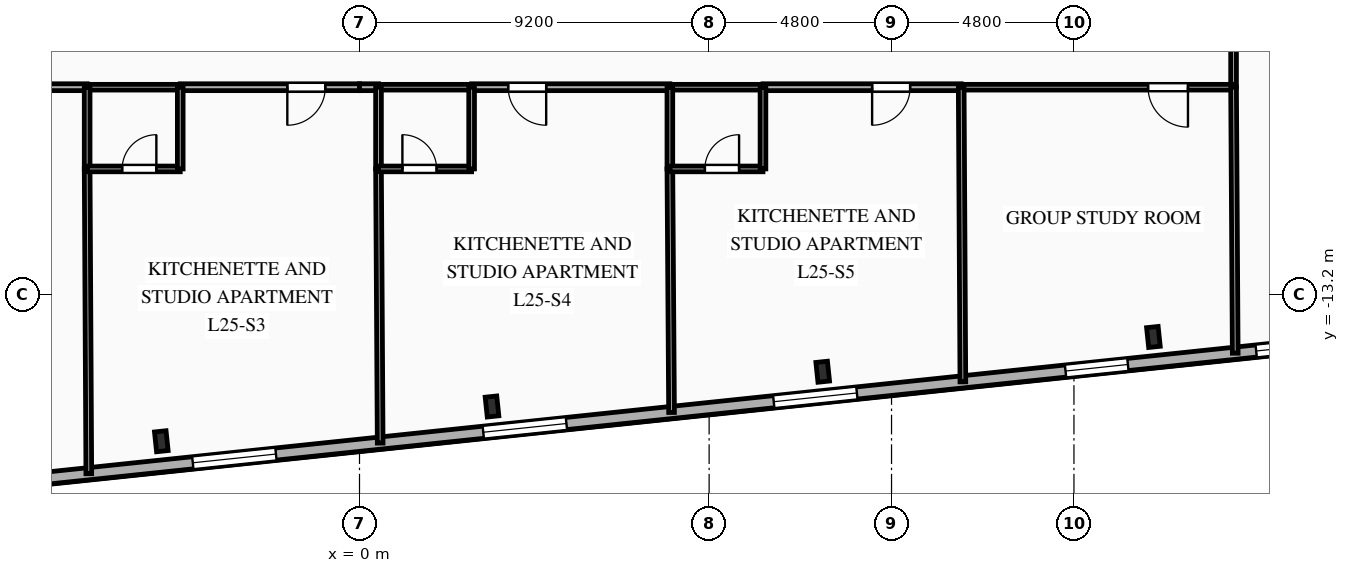
"""IFC4 building model, lengths in metres.
Left out: names, types, materials, properties, quantities, classifications, styles, units other than length and angle.
Written with IfcOpenShell. Run it as: python <this file> out.ifc"""

import sys

from ifc_helpers import new_model, si_unit, direction, frame, frame_2d, origin, origin_2d, place, context, subcontext, project, spatial, rectangle, i_section, extrude, element, fill, save


model = new_model("IFC4")
c1 = context("Model", 3, precision=1e-05, world=origin(), true_north=direction((0.0, 1.0)))
c2 = subcontext(c1, "Body", "Model", "MODEL_VIEW")
j1 = project(units=[si_unit("LENGTHUNIT", "METRE"), si_unit("PLANEANGLEUNIT", "RADIAN")], contexts=[c1])
p1 = place(None, origin())
s1 = spatial("IfcSite", under=j1, at=p1, CompositionType="ELEMENT")
p2 = place(p1, origin())
s2 = spatial("IfcBuilding", under=s1, at=p2, CompositionType="ELEMENT")
p3 = place(p2, frame((0.0, 0.0, 92.4)))
s3 = spatial("IfcBuildingStorey", under=s2, at=p3, CompositionType="ELEMENT", Elevation=92.4)
for number, where, z_axis, x_axis in (
    (1, (-5.215, -17.066, 0.0), (0.0, 0.0, 1.0), (0.995, 0.105, 0.0)),
    (2, (3.487, -16.151, 0.0), (0.0, 0.0, 1.0), (0.995, 0.105, 0.0)),
    (3, (12.189, -15.237, 0.0), (0.0, 0.0, 1.0), (0.995, 0.105, 0.0)),
    (4, (20.891, -14.322, 0.0), (0.0, 0.0, 1.0), (0.995, 0.105, 0.0)),
):
    element("IfcColumn", number, at=place(p3, frame(where, z_axis=z_axis, x_axis=x_axis)), inside=s3, PredefinedType="COLUMN", context=c2, shape_type="SweptSolid", body=[
        extrude(i_section(OverallWidth=0.306, OverallDepth=0.524, WebThickness=0.021, FlangeThickness=0.04, FilletRadius=0.027, at=origin_2d()), origin(), (0.0, 0.0, 1.0), 3.35),
    ])
p4 = place(p3, frame((30.307, -13.986, 0.0), z_axis=(0.0, 0.0, 1.0), x_axis=(-0.994521628355, -0.104531003701, 0.0)))
e5 = element("IfcWall", 5, at=p4, inside=s3, PredefinedType="SOLIDWALL", context=c2, shape_type="SweptSolid", body=[
    extrude(rectangle(XDim=53.8, YDim=0.32, at=frame_2d((26.9, 0.0))), origin(), (0.0, 0.0, 1.0), 3.045),
])
p5 = place(p4, frame((1.657, 0.0, 0.85)))
e6 = element("IfcOpeningElement", 6, at=p5, cuts=e5, PredefinedType="OPENING", context=c2, shape_type="SweptSolid", body=[
    extrude(rectangle(XDim=1.65, YDim=1.85, at=frame_2d((0.825, 0.925))), frame((0.0, 0.17, 0.0), z_axis=(0.0, -1.0, 0.0), x_axis=(1.0, 0.0, 0.0)), (0.0, 0.0, 1.0), 0.34),
])
p6 = place(p4, frame((5.099, 0.0, 0.85)))
e7 = element("IfcOpeningElement", 7, at=p6, cuts=e5, PredefinedType="OPENING", context=c2, shape_type="SweptSolid", body=[
    extrude(rectangle(XDim=1.65, YDim=1.85, at=frame_2d((0.825, 0.925))), frame((0.0, 0.17, 0.0), z_axis=(0.0, -1.0, 0.0), x_axis=(1.0, 0.0, 0.0)), (0.0, 0.0, 1.0), 0.34),
])
p7 = place(p4, frame((10.143, 0.0, 0.85)))
e8 = element("IfcOpeningElement", 8, at=p7, cuts=e5, PredefinedType="OPENING", context=c2, shape_type="SweptSolid", body=[
    extrude(rectangle(XDim=1.65, YDim=1.85, at=frame_2d((0.825, 0.925))), frame((0.0, 0.17, 0.0), z_axis=(0.0, -1.0, 0.0), x_axis=(1.0, 0.0, 0.0)), (0.0, 0.0, 1.0), 0.34),
])
p8 = place(p4, frame((17.314, 0.0, 0.85)))
e9 = element("IfcOpeningElement", 9, at=p8, cuts=e5, PredefinedType="OPENING", context=c2, shape_type="SweptSolid", body=[
    extrude(rectangle(XDim=2.2, YDim=1.85, at=frame_2d((1.1, 0.925))), frame((0.0, 0.17, 0.0), z_axis=(0.0, -1.0, 0.0), x_axis=(1.0, 0.0, 0.0)), (0.0, 0.0, 1.0), 0.34),
])
p9 = place(p4, frame((25.0, 0.0, 0.85)))
e10 = element("IfcOpeningElement", 10, at=p9, cuts=e5, PredefinedType="OPENING", context=c2, shape_type="SweptSolid", body=[
    extrude(rectangle(XDim=2.2, YDim=1.85, at=frame_2d((1.1, 0.925))), frame((0.0, 0.17, 0.0), z_axis=(0.0, -1.0, 0.0), x_axis=(1.0, 0.0, 0.0)), (0.0, 0.0, 1.0), 0.34),
])
p10 = place(p4, frame((32.685, 0.0, 0.85)))
e11 = element("IfcOpeningElement", 11, at=p10, cuts=e5, PredefinedType="OPENING", context=c2, shape_type="SweptSolid", body=[
    extrude(rectangle(XDim=2.2, YDim=1.85, at=frame_2d((1.1, 0.925))), frame((0.0, 0.17, 0.0), z_axis=(0.0, -1.0, 0.0), x_axis=(1.0, 0.0, 0.0)), (0.0, 0.0, 1.0), 0.34),
])
p11 = place(p4, frame((40.411, 0.0, 0.85)))
e12 = element("IfcOpeningElement", 12, at=p11, cuts=e5, PredefinedType="OPENING", context=c2, shape_type="SweptSolid", body=[
    extrude(rectangle(XDim=2.2, YDim=1.85, at=frame_2d((1.1, 0.925))), frame((0.0, 0.17, 0.0), z_axis=(0.0, -1.0, 0.0), x_axis=(1.0, 0.0, 0.0)), (0.0, 0.0, 1.0), 0.34),
])
p12 = place(p4, frame((46.61, 0.0, 0.85)))
e13 = element("IfcOpeningElement", 13, at=p12, cuts=e5, PredefinedType="OPENING", context=c2, shape_type="SweptSolid", body=[
    extrude(rectangle(XDim=1.65, YDim=1.85, at=frame_2d((0.825, 0.925))), frame((0.0, 0.17, 0.0), z_axis=(0.0, -1.0, 0.0), x_axis=(1.0, 0.0, 0.0)), (0.0, 0.0, 1.0), 0.34),
])
p13 = place(p4, frame((50.613, 0.0, 0.85)))
e14 = element("IfcOpeningElement", 14, at=p13, cuts=e5, PredefinedType="OPENING", context=c2, shape_type="SweptSolid", body=[
    extrude(rectangle(XDim=1.65, YDim=1.85, at=frame_2d((0.825, 0.925))), frame((0.0, 0.17, 0.0), z_axis=(0.0, -1.0, 0.0), x_axis=(1.0, 0.0, 0.0)), (0.0, 0.0, 1.0), 0.34),
])
p14 = place(p3, frame((-7.167, -7.75, 0.0), z_axis=(0.0, 0.0, 1.0), x_axis=(-1.0, 0.0, 0.0)))
e15 = element("IfcWall", 15, at=p14, inside=s3, PredefinedType="PARTITIONING", context=c2, shape_type="SweptSolid", body=[
    extrude(rectangle(XDim=5.216, YDim=0.18, at=frame_2d((2.608, 0.0))), origin(), (0.0, 0.0, 1.0), 3.045),
])
p15 = place(p14, frame((3.254, 0.0, 0.0)))
e16 = element("IfcOpeningElement", 16, at=p15, cuts=e15, PredefinedType="OPENING", context=c2, shape_type="SweptSolid", body=[
    extrude(rectangle(XDim=1.0, YDim=2.15, at=frame_2d((0.5, 1.075))), frame((0.0, 0.1, 0.0), z_axis=(0.0, -1.0, 0.0), x_axis=(1.0, 0.0, 0.0)), (0.0, 0.0, 1.0), 0.2),
])
p16 = place(p3, frame((0.0, -7.75, 0.0), z_axis=(0.0, 0.0, 1.0), x_axis=(-1.0, 0.0, 0.0)))
e17 = element("IfcWall", 17, at=p16, inside=s3, PredefinedType="PARTITIONING", context=c2, shape_type="SweptSolid", body=[
    extrude(rectangle(XDim=4.717, YDim=0.18, at=frame_2d((2.358, 0.0))), origin(), (0.0, 0.0, 1.0), 3.045),
])
p17 = place(p16, frame((0.9, 0.0, 0.0)))
e18 = element("IfcOpeningElement", 18, at=p17, cuts=e17, PredefinedType="OPENING", context=c2, shape_type="SweptSolid", body=[
    extrude(rectangle(XDim=1.0, YDim=2.15, at=frame_2d((0.5, 1.075))), frame((0.0, 0.1, 0.0), z_axis=(0.0, -1.0, 0.0), x_axis=(1.0, 0.0, 0.0)), (0.0, 0.0, 1.0), 0.2),
])
p18 = place(p3, frame((-4.717, -7.75, 0.0), z_axis=(0.0, 0.0, 1.0), x_axis=(-1.0, 0.0, 0.0)))
e19 = element("IfcWall", 19, at=p18, inside=s3, PredefinedType="PLUMBINGWALL", context=c2, shape_type="SweptSolid", body=[
    extrude(rectangle(XDim=2.45, YDim=0.15, at=frame_2d((1.225, 0.0))), origin(), (0.0, 0.0, 1.0), 3.045),
])
p19 = place(p3, frame((23.0, -5.6, 0.0), z_axis=(0.0, 0.0, 1.0), x_axis=(0.0, -1.0, 0.0)))
e20 = element("IfcWall", 20, at=p19, inside=s3, PredefinedType="PARTITIONING", context=c2, shape_type="SweptSolid", body=[
    extrude(rectangle(XDim=2.15, YDim=0.15, at=frame_2d((1.075, 0.0))), origin(), (0.0, 0.0, 1.0), 3.045),
])
p20 = place(p3, frame((0.5, -7.75, 0.0), z_axis=(0.0, 0.0, 1.0), x_axis=(-1.0, 0.0, 0.0)))
e21 = element("IfcWall", 21, at=p20, inside=s3, PredefinedType="PARTITIONING", context=c2, shape_type="SweptSolid", body=[
    extrude(rectangle(XDim=0.5, YDim=0.18, at=frame_2d((0.25, 0.0))), origin(), (0.0, 0.0, 1.0), 3.045),
])
p21 = place(p3, frame((8.167, -7.75, 0.0), z_axis=(0.0, 0.0, 1.0), x_axis=(-1.0, 0.0, 0.0)))
e22 = element("IfcWall", 22, at=p21, inside=s3, PredefinedType="PARTITIONING", context=c2, shape_type="SweptSolid", body=[
    extrude(rectangle(XDim=5.217, YDim=0.18, at=frame_2d((2.608, 0.0))), origin(), (0.0, 0.0, 1.0), 3.045),
])
p22 = place(p21, frame((3.255, 0.0, 0.0)))
e23 = element("IfcOpeningElement", 23, at=p22, cuts=e22, PredefinedType="OPENING", context=c2, shape_type="SweptSolid", body=[
    extrude(rectangle(XDim=1.0, YDim=2.15, at=frame_2d((0.5, 1.075))), frame((0.0, 0.1, 0.0), z_axis=(0.0, -1.0, 0.0), x_axis=(1.0, 0.0, 0.0)), (0.0, 0.0, 1.0), 0.2),
])
p23 = place(p3, frame((2.95, -7.75, 0.0), z_axis=(0.0, 0.0, 1.0), x_axis=(-1.0, 0.0, 0.0)))
e24 = element("IfcWall", 24, at=p23, inside=s3, PredefinedType="PLUMBINGWALL", context=c2, shape_type="SweptSolid", body=[
    extrude(rectangle(XDim=2.45, YDim=0.15, at=frame_2d((1.225, 0.0))), origin(), (0.0, 0.0, 1.0), 3.045),
])
p24 = place(p3, frame((15.833, -7.75, 0.0), z_axis=(0.0, 0.0, 1.0), x_axis=(-1.0, 0.0, 0.0)))
e25 = element("IfcWall", 25, at=p24, inside=s3, PredefinedType="PARTITIONING", context=c2, shape_type="SweptSolid", body=[
    extrude(rectangle(XDim=5.216, YDim=0.18, at=frame_2d((2.608, 0.0))), origin(), (0.0, 0.0, 1.0), 3.045),
])
p25 = place(p24, frame((1.344, 0.0, 0.0)))
e26 = element("IfcOpeningElement", 26, at=p25, cuts=e25, PredefinedType="OPENING", context=c2, shape_type="SweptSolid", body=[
    extrude(rectangle(XDim=1.0, YDim=2.15, at=frame_2d((0.5, 1.075))), frame((0.0, 0.1, 0.0), z_axis=(0.0, -1.0, 0.0), x_axis=(1.0, 0.0, 0.0)), (0.0, 0.0, 1.0), 0.2),
])
p26 = place(p3, frame((10.617, -7.75, 0.0), z_axis=(0.0, 0.0, 1.0), x_axis=(-1.0, 0.0, 0.0)))
e27 = element("IfcWall", 27, at=p26, inside=s3, PredefinedType="PLUMBINGWALL", context=c2, shape_type="SweptSolid", body=[
    extrude(rectangle(XDim=2.45, YDim=0.15, at=frame_2d((1.225, 0.0))), origin(), (0.0, 0.0, 1.0), 3.045),
])
p27 = place(p3, frame((23.0, -7.75, 0.0), z_axis=(0.0, 0.0, 1.0), x_axis=(-1.0, 0.0, 0.0)))
e28 = element("IfcWall", 28, at=p27, inside=s3, PredefinedType="PARTITIONING", context=c2, shape_type="SweptSolid", body=[
    extrude(rectangle(XDim=7.167, YDim=0.15, at=frame_2d((3.583, 0.0))), origin(), (0.0, 0.0, 1.0), 3.045),
])
p28 = place(p27, frame((1.2, 0.0, 0.0)))
e29 = element("IfcOpeningElement", 29, at=p28, cuts=e28, PredefinedType="OPENING", context=c2, shape_type="SweptSolid", body=[
    extrude(rectangle(XDim=1.05, YDim=2.15, at=frame_2d((0.525, 1.075))), frame((0.0, 0.085, 0.0), z_axis=(0.0, -1.0, 0.0), x_axis=(1.0, 0.0, 0.0)), (0.0, 0.0, 1.0), 0.17),
])
p29 = place(p3, frame((23.044, -14.749, 0.0), z_axis=(0.0, 0.0, 1.0), x_axis=(-0.006278653971, 0.999980289058, 0.0)))
e30 = element("IfcWall", 30, at=p29, inside=s3, PredefinedType="PARTITIONING", context=c2, shape_type="SweptSolid", body=[
    extrude(rectangle(XDim=6.999, YDim=0.15, at=frame_2d((3.5, 0.0))), origin(), (0.0, 0.0, 1.0), 3.045),
])
p30 = place(p3, frame((-7.167, -9.9, 0.0), z_axis=(0.0, 0.0, 1.0), x_axis=(0.005479369798, -0.999984988141, 0.0)))
e31 = element("IfcWall", 31, at=p30, inside=s3, PredefinedType="PARTITIONING", context=c2, shape_type="SweptSolid", body=[
    extrude(rectangle(XDim=8.02, YDim=0.15, at=frame_2d((4.01, 0.0))), origin(), (0.0, 0.0, 1.0), 3.045),
])
p31 = place(p3, frame((-7.167, -7.75, 0.0), z_axis=(0.0, 0.0, 1.0), x_axis=(0.0, -1.0, 0.0)))
e32 = element("IfcWall", 32, at=p31, inside=s3, PredefinedType="PLUMBINGWALL", context=c2, shape_type="SweptSolid", body=[
    extrude(rectangle(XDim=2.15, YDim=0.15, at=frame_2d((1.075, 0.0))), origin(), (0.0, 0.0, 1.0), 3.045),
])
p32 = place(p3, frame((-7.167, -9.9, 0.0), z_axis=(0.0, 0.0, 1.0), x_axis=(1.0, 0.0, 0.0)))
e33 = element("IfcWall", 33, at=p32, inside=s3, PredefinedType="PLUMBINGWALL", context=c2, shape_type="SweptSolid", body=[
    extrude(rectangle(XDim=2.45, YDim=0.15, at=frame_2d((1.225, 0.0))), origin(), (0.0, 0.0, 1.0), 3.045),
])
p33 = place(p32, frame((0.921, 0.0, 0.0)))
e34 = element("IfcOpeningElement", 34, at=p33, cuts=e33, PredefinedType="OPENING", context=c2, shape_type="SweptSolid", body=[
    extrude(rectangle(XDim=0.9, YDim=2.1, at=frame_2d((0.45, 1.05))), frame((0.0, 0.085, 0.0), z_axis=(0.0, -1.0, 0.0), x_axis=(1.0, 0.0, 0.0)), (0.0, 0.0, 1.0), 0.17),
])
p34 = place(p3, frame((-4.717, -9.9, 0.0), z_axis=(0.0, 0.0, 1.0), x_axis=(0.0, 1.0, 0.0)))
e35 = element("IfcWall", 35, at=p34, inside=s3, PredefinedType="PLUMBINGWALL", context=c2, shape_type="SweptSolid", body=[
    extrude(rectangle(XDim=2.15, YDim=0.15, at=frame_2d((1.075, 0.0))), origin(), (0.0, 0.0, 1.0), 3.045),
])
p35 = place(p3, frame((0.5, -9.9, 0.0), z_axis=(0.0, 0.0, 1.0), x_axis=(0.006091463685, -0.999981446863, 0.0)))
e36 = element("IfcWall", 36, at=p35, inside=s3, PredefinedType="PARTITIONING", context=c2, shape_type="SweptSolid", body=[
    extrude(rectangle(XDim=7.214, YDim=0.15, at=frame_2d((3.607, 0.0))), origin(), (0.0, 0.0, 1.0), 3.045),
])
p36 = place(p3, frame((0.5, -7.75, 0.0), z_axis=(0.0, 0.0, 1.0), x_axis=(0.0, -1.0, 0.0)))
e37 = element("IfcWall", 37, at=p36, inside=s3, PredefinedType="PLUMBINGWALL", context=c2, shape_type="SweptSolid", body=[
    extrude(rectangle(XDim=2.15, YDim=0.15, at=frame_2d((1.075, 0.0))), origin(), (0.0, 0.0, 1.0), 3.045),
])
p37 = place(p3, frame((0.5, -9.9, 0.0), z_axis=(0.0, 0.0, 1.0), x_axis=(1.0, 0.0, 0.0)))
e38 = element("IfcWall", 38, at=p37, inside=s3, PredefinedType="PLUMBINGWALL", context=c2, shape_type="SweptSolid", body=[
    extrude(rectangle(XDim=2.45, YDim=0.15, at=frame_2d((1.225, 0.0))), origin(), (0.0, 0.0, 1.0), 3.045),
])
p38 = place(p37, frame((0.629, 0.0, 0.0)))
e39 = element("IfcOpeningElement", 39, at=p38, cuts=e38, PredefinedType="OPENING", context=c2, shape_type="SweptSolid", body=[
    extrude(rectangle(XDim=0.9, YDim=2.1, at=frame_2d((0.45, 1.05))), frame((0.0, 0.085, 0.0), z_axis=(0.0, -1.0, 0.0), x_axis=(1.0, 0.0, 0.0)), (0.0, 0.0, 1.0), 0.17),
])
p39 = place(p3, frame((2.95, -9.9, 0.0), z_axis=(0.0, 0.0, 1.0), x_axis=(0.0, 1.0, 0.0)))
e40 = element("IfcWall", 40, at=p39, inside=s3, PredefinedType="PLUMBINGWALL", context=c2, shape_type="SweptSolid", body=[
    extrude(rectangle(XDim=2.15, YDim=0.15, at=frame_2d((1.075, 0.0))), origin(), (0.0, 0.0, 1.0), 3.045),
])
p40 = place(p3, frame((8.167, -9.9, 0.0), z_axis=(0.0, 0.0, 1.0), x_axis=(0.006857504102, -0.999976487042, 0.0)))
e41 = element("IfcWall", 41, at=p40, inside=s3, PredefinedType="PARTITIONING", context=c2, shape_type="SweptSolid", body=[
    extrude(rectangle(XDim=6.408, YDim=0.15, at=frame_2d((3.204, 0.0))), origin(), (0.0, 0.0, 1.0), 3.045),
])
p41 = place(p3, frame((8.167, -7.75, 0.0), z_axis=(0.0, 0.0, 1.0), x_axis=(0.0, -1.0, 0.0)))
e42 = element("IfcWall", 42, at=p41, inside=s3, PredefinedType="PLUMBINGWALL", context=c2, shape_type="SweptSolid", body=[
    extrude(rectangle(XDim=2.15, YDim=0.15, at=frame_2d((1.075, 0.0))), origin(), (0.0, 0.0, 1.0), 3.045),
])
p42 = place(p3, frame((8.167, -9.9, 0.0), z_axis=(0.0, 0.0, 1.0), x_axis=(1.0, 0.0, 0.0)))
e43 = element("IfcWall", 43, at=p42, inside=s3, PredefinedType="PLUMBINGWALL", context=c2, shape_type="SweptSolid", body=[
    extrude(rectangle(XDim=2.45, YDim=0.15, at=frame_2d((1.225, 0.0))), origin(), (0.0, 0.0, 1.0), 3.045),
])
p43 = place(p42, frame((0.921, 0.0, 0.0)))
e44 = element("IfcOpeningElement", 44, at=p43, cuts=e43, PredefinedType="OPENING", context=c2, shape_type="SweptSolid", body=[
    extrude(rectangle(XDim=0.9, YDim=2.1, at=frame_2d((0.45, 1.05))), frame((0.0, 0.085, 0.0), z_axis=(0.0, -1.0, 0.0), x_axis=(1.0, 0.0, 0.0)), (0.0, 0.0, 1.0), 0.17),
])
p44 = place(p3, frame((10.617, -9.9, 0.0), z_axis=(0.0, 0.0, 1.0), x_axis=(0.0, 1.0, 0.0)))
e45 = element("IfcWall", 45, at=p44, inside=s3, PredefinedType="PLUMBINGWALL", context=c2, shape_type="SweptSolid", body=[
    extrude(rectangle(XDim=2.15, YDim=0.15, at=frame_2d((1.075, 0.0))), origin(), (0.0, 0.0, 1.0), 2.53),
])
p45 = place(p3, frame((15.833, -7.75, 0.0), z_axis=(0.0, 0.0, 1.0), x_axis=(0.005668486116, -0.999983934004, 0.0)))
e46 = element("IfcWall", 46, at=p45, inside=s3, PredefinedType="PARTITIONING", context=c2, shape_type="SweptSolid", body=[
    extrude(rectangle(XDim=7.753, YDim=0.15, at=frame_2d((3.876, 0.0))), origin(), (0.0, 0.0, 1.0), 3.045),
])
p46 = place(p6, origin())
e47 = element("IfcWindow", 47, at=p46, inside=s3, PartitioningType="SINGLE_PANEL", PredefinedType="WINDOW", context=c2, shape_type="SweptSolid", body=[
    extrude(rectangle(XDim=1.65, YDim=1.85, at=frame_2d((0.825, 0.925))), frame((0.0, 0.03, 0.0), z_axis=(0.0, -1.0, 0.0), x_axis=(1.0, 0.0, 0.0)), (0.0, 0.0, 1.0), 0.06),
])
fill(e7, e47)
p47 = place(p7, origin())
e48 = element("IfcWindow", 48, at=p47, inside=s3, PartitioningType="SINGLE_PANEL", PredefinedType="WINDOW", context=c2, shape_type="SweptSolid", body=[
    extrude(rectangle(XDim=1.65, YDim=1.85, at=frame_2d((0.825, 0.925))), frame((0.0, 0.03, 0.0), z_axis=(0.0, -1.0, 0.0), x_axis=(1.0, 0.0, 0.0)), (0.0, 0.0, 1.0), 0.06),
])
fill(e8, e48)
p48 = place(p8, origin())
e49 = element("IfcWindow", 49, at=p48, inside=s3, PartitioningType="SINGLE_PANEL", PredefinedType="WINDOW", context=c2, shape_type="SweptSolid", body=[
    extrude(rectangle(XDim=2.2, YDim=1.85, at=frame_2d((1.1, 0.925))), frame((0.0, 0.03, 0.0), z_axis=(0.0, -1.0, 0.0), x_axis=(1.0, 0.0, 0.0)), (0.0, 0.0, 1.0), 0.06),
])
fill(e9, e49)
p49 = place(p9, origin())
e50 = element("IfcWindow", 50, at=p49, inside=s3, PartitioningType="SINGLE_PANEL", PredefinedType="WINDOW", context=c2, shape_type="SweptSolid", body=[
    extrude(rectangle(XDim=2.2, YDim=1.85, at=frame_2d((1.1, 0.925))), frame((0.0, 0.03, 0.0), z_axis=(0.0, -1.0, 0.0), x_axis=(1.0, 0.0, 0.0)), (0.0, 0.0, 1.0), 0.06),
])
fill(e10, e50)
p50 = place(p10, origin())
e51 = element("IfcWindow", 51, at=p50, inside=s3, PartitioningType="SINGLE_PANEL", PredefinedType="WINDOW", context=c2, shape_type="SweptSolid", body=[
    extrude(rectangle(XDim=2.2, YDim=1.85, at=frame_2d((1.1, 0.925))), frame((0.0, 0.03, 0.0), z_axis=(0.0, -1.0, 0.0), x_axis=(1.0, 0.0, 0.0)), (0.0, 0.0, 1.0), 0.06),
])
fill(e11, e51)
p51 = place(p17, origin())
e52 = element("IfcDoor", 52, at=p51, inside=s3, OperationType="SINGLE_SWING_RIGHT", PredefinedType="DOOR", context=c2, shape_type="SweptSolid", body=[
    extrude(rectangle(XDim=1.0, YDim=2.15, at=frame_2d((0.5, 1.075))), frame((0.0, 0.025, 0.0), z_axis=(0.0, -1.0, 0.0), x_axis=(1.0, 0.0, 0.0)), (0.0, 0.0, 1.0), 0.05),
])
fill(e18, e52)
p52 = place(p22, origin())
e53 = element("IfcDoor", 53, at=p52, inside=s3, OperationType="SINGLE_SWING_LEFT", PredefinedType="DOOR", context=c2, shape_type="SweptSolid", body=[
    extrude(rectangle(XDim=1.0, YDim=2.15, at=frame_2d((0.5, 1.075))), frame((0.0, 0.025, 0.0), z_axis=(0.0, -1.0, 0.0), x_axis=(1.0, 0.0, 0.0)), (0.0, 0.0, 1.0), 0.05),
])
fill(e23, e53)
p53 = place(p25, origin())
e54 = element("IfcDoor", 54, at=p53, inside=s3, OperationType="SINGLE_SWING_RIGHT", PredefinedType="DOOR", context=c2, shape_type="SweptSolid", body=[
    extrude(rectangle(XDim=1.0, YDim=2.15, at=frame_2d((0.5, 1.075))), frame((0.0, 0.025, 0.0), z_axis=(0.0, -1.0, 0.0), x_axis=(1.0, 0.0, 0.0)), (0.0, 0.0, 1.0), 0.05),
])
fill(e26, e54)
p54 = place(p28, origin())
e55 = element("IfcDoor", 55, at=p54, inside=s3, OperationType="SINGLE_SWING_LEFT", PredefinedType="DOOR", context=c2, shape_type="SweptSolid", body=[
    extrude(rectangle(XDim=1.05, YDim=2.15, at=frame_2d((0.525, 1.075))), frame((0.0, 0.025, 0.0), z_axis=(0.0, -1.0, 0.0), x_axis=(1.0, 0.0, 0.0)), (0.0, 0.0, 1.0), 0.05),
])
fill(e29, e55)
p55 = place(p33, origin())
e56 = element("IfcDoor", 56, at=p55, inside=s3, OperationType="SINGLE_SWING_RIGHT", PredefinedType="DOOR", context=c2, shape_type="SweptSolid", body=[
    extrude(rectangle(XDim=0.9, YDim=2.1, at=frame_2d((0.45, 1.05))), frame((0.0, 0.025, 0.0), z_axis=(0.0, -1.0, 0.0), x_axis=(1.0, 0.0, 0.0)), (0.0, 0.0, 1.0), 0.05),
])
fill(e34, e56)
p56 = place(p38, origin())
e57 = element("IfcDoor", 57, at=p56, inside=s3, OperationType="SINGLE_SWING_LEFT", PredefinedType="DOOR", context=c2, shape_type="SweptSolid", body=[
    extrude(rectangle(XDim=0.9, YDim=2.1, at=frame_2d((0.45, 1.05))), frame((0.0, 0.025, 0.0), z_axis=(0.0, -1.0, 0.0), x_axis=(1.0, 0.0, 0.0)), (0.0, 0.0, 1.0), 0.05),
])
fill(e39, e57)
p57 = place(p43, origin())
e58 = element("IfcDoor", 58, at=p57, inside=s3, OperationType="SINGLE_SWING_RIGHT", PredefinedType="DOOR", context=c2, shape_type="SweptSolid", body=[
    extrude(rectangle(XDim=0.9, YDim=2.1, at=frame_2d((0.45, 1.05))), frame((0.0, 0.025, 0.0), z_axis=(0.0, -1.0, 0.0), x_axis=(1.0, 0.0, 0.0)), (0.0, 0.0, 1.0), 0.05),
])
fill(e44, e58)
save(model, sys.argv[1])
